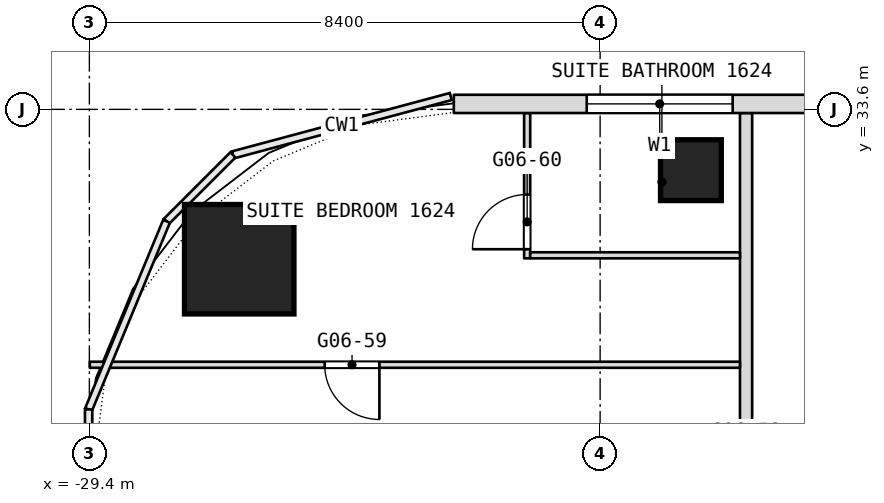
"""IFC4 building model, lengths in metres.
Left out: names, types, materials, properties, quantities, classifications, styles, units other than length and angle.
Written with IfcOpenShell. Run it as: python <this file> out.ifc"""

import sys

from ifc_helpers import new_model, si_unit, direction, frame, frame_2d, origin, origin_2d, place, context, subcontext, project, spatial, rectangle, extrude, element, fill, save


model = new_model("IFC4")
c1 = context("Model", 3, precision=1e-05, world=origin(), true_north=direction((0.0, 1.0)))
c2 = subcontext(c1, "Body", "Model", "MODEL_VIEW")
j1 = project(units=[si_unit("LENGTHUNIT", "METRE"), si_unit("PLANEANGLEUNIT", "RADIAN")], contexts=[c1])
p1 = place(None, origin())
s1 = spatial("IfcSite", under=j1, at=p1, CompositionType="ELEMENT")
p2 = place(p1, origin())
s2 = spatial("IfcBuilding", under=s1, at=p2, CompositionType="ELEMENT")
p3 = place(p2, frame((0.0, 0.0, 72.5)))
s3 = spatial("IfcBuildingStorey", under=s2, at=p3, CompositionType="ELEMENT", Elevation=72.5)
p4 = place(p3, frame((-26.936, 31.135, 0.0), z_axis=(0.0, 0.0, 1.0), x_axis=(1.0, 0.0, 0.0)))
e1 = element("IfcColumn", 1, at=p4, inside=s3, PredefinedType="COLUMN", context=c2, shape_type="SweptSolid", body=[
    extrude(rectangle(XDim=1.8, YDim=1.8, at=origin_2d()), origin(), (0.0, 0.0, 1.0), 3.6),
])
p5 = place(p3, frame((-19.507, 32.6, 0.0), z_axis=(0.0, 0.0, 1.0), x_axis=(1.0, 0.0, 0.0)))
e2 = element("IfcColumn", 2, at=p5, inside=s3, PredefinedType="COLUMN", context=c2, shape_type="SweptSolid", body=[
    extrude(rectangle(XDim=1.0, YDim=1.0, at=origin_2d()), origin(), (0.0, 0.0, 1.0), 3.6),
])
p6 = place(p3, frame((-18.6, 18.5, 0.0), z_axis=(0.0, 0.0, 1.0), x_axis=(0.0, 1.0, 0.0)))
e3 = element("IfcWall", 3, at=p6, inside=s3, PredefinedType="PARTITIONING", context=c2, shape_type="SweptSolid", body=[
    extrude(rectangle(XDim=15.04, YDim=0.2, at=frame_2d((7.52, 0.0))), origin(), (0.0, 0.0, 1.0), 3.34),
])
p7 = place(p6, frame((2.9, 0.0, 0.0)))
e4 = element("IfcOpeningElement", 4, at=p7, cuts=e3, PredefinedType="OPENING", context=c2, shape_type="SweptSolid", body=[
    extrude(rectangle(XDim=1.0, YDim=2.1, at=frame_2d((0.5, 1.05))), frame((0.0, 0.1, 0.0), z_axis=(0.0, -1.0, 0.0), x_axis=(1.0, 0.0, 0.0)), (0.0, 0.0, 1.0), 0.2),
])
p8 = place(p6, frame((8.25, 0.0, 0.0)))
e5 = element("IfcOpeningElement", 5, at=p8, cuts=e3, PredefinedType="OPENING", context=c2, shape_type="SweptSolid", body=[
    extrude(rectangle(XDim=1.1, YDim=2.1, at=frame_2d((0.55, 1.05))), frame((0.0, 0.1, 0.0), z_axis=(0.0, -1.0, 0.0), x_axis=(1.0, 0.0, 0.0)), (0.0, 0.0, 1.0), 0.2),
])
p9 = place(p3, frame((-22.2, 31.15, 0.0), z_axis=(0.0, 0.0, 1.0), x_axis=(0.0, 1.0, 0.0)))
e6 = element("IfcWall", 6, at=p9, inside=s3, PredefinedType="PARTITIONING", context=c2, shape_type="SweptSolid", body=[
    extrude(rectangle(XDim=2.39, YDim=0.1, at=frame_2d((1.195, 0.0))), origin(), (0.0, 0.0, 1.0), 3.34),
])
p10 = place(p9, frame((0.15, 0.0, 0.0)))
e7 = element("IfcOpeningElement", 7, at=p10, cuts=e6, PredefinedType="OPENING", context=c2, shape_type="SweptSolid", body=[
    extrude(rectangle(XDim=0.9, YDim=2.1, at=frame_2d((0.45, 1.05))), frame((0.0, 0.05, 0.0), z_axis=(0.0, -1.0, 0.0), x_axis=(1.0, 0.0, 0.0)), (0.0, 0.0, 1.0), 0.1),
])
p11 = place(p3, frame((-29.393, 29.4, 0.0), z_axis=(0.0, 0.0, 1.0), x_axis=(1.0, 0.0, 0.0)))
e8 = element("IfcWall", 8, at=p11, inside=s3, PredefinedType="PARTITIONING", context=c2, shape_type="SweptSolid", body=[
    extrude(rectangle(XDim=10.693, YDim=0.1, at=frame_2d((5.347, 0.0))), origin(), (0.0, 0.0, 1.0), 3.34),
])
p12 = place(p11, frame((3.863, 0.0, 0.0)))
e9 = element("IfcOpeningElement", 9, at=p12, cuts=e8, PredefinedType="OPENING", context=c2, shape_type="SweptSolid", body=[
    extrude(rectangle(XDim=0.9, YDim=2.1, at=frame_2d((0.45, 1.05))), frame((0.0, 0.05, 0.0), z_axis=(0.0, -1.0, 0.0), x_axis=(1.0, 0.0, 0.0)), (0.0, 0.0, 1.0), 0.1),
])
p13 = place(p3, frame((-22.15, 31.2, 0.0), z_axis=(0.0, 0.0, 1.0), x_axis=(1.0, 0.0, 0.0)))
e10 = element("IfcWall", 10, at=p13, inside=s3, PredefinedType="PARTITIONING", context=c2, shape_type="SweptSolid", body=[
    extrude(rectangle(XDim=3.45, YDim=0.1, at=frame_2d((1.725, 0.0))), origin(), (0.0, 0.0, 1.0), 3.34),
])
p14 = place(p3, frame((23.406, 33.69, 0.0), z_axis=(0.0, 0.0, 1.0), x_axis=(-1.0, 0.0, 0.0)))
e11 = element("IfcWall", 11, at=p14, inside=s3, PredefinedType="NOTDEFINED", context=c2, shape_type="SweptSolid", body=[
    extrude(rectangle(XDim=46.812, YDim=0.3, at=frame_2d((23.406, 0.0))), origin(), (0.0, 0.0, 1.0), 3.6),
])
p15 = place(p14, frame((2.186, 0.0, 0.9)))
e12 = element("IfcOpeningElement", 12, at=p15, cuts=e11, PredefinedType="OPENING", context=c2, shape_type="SweptSolid", body=[
    extrude(rectangle(XDim=2.4, YDim=2.1, at=frame_2d((1.2, 1.05))), frame((0.0, 0.15, 0.0), z_axis=(0.0, -1.0, 0.0), x_axis=(1.0, 0.0, 0.0)), (0.0, 0.0, 1.0), 0.3),
])
p16 = place(p14, frame((7.506, 0.0, 0.9)))
e13 = element("IfcOpeningElement", 13, at=p16, cuts=e11, PredefinedType="OPENING", context=c2, shape_type="SweptSolid", body=[
    extrude(rectangle(XDim=2.4, YDim=2.1, at=frame_2d((1.2, 1.05))), frame((0.0, 0.15, 0.0), z_axis=(0.0, -1.0, 0.0), x_axis=(1.0, 0.0, 0.0)), (0.0, 0.0, 1.0), 0.3),
])
p17 = place(p14, frame((11.706, 0.0, 0.9)))
e14 = element("IfcOpeningElement", 14, at=p17, cuts=e11, PredefinedType="OPENING", context=c2, shape_type="SweptSolid", body=[
    extrude(rectangle(XDim=2.4, YDim=2.1, at=frame_2d((1.2, 1.05))), frame((0.0, 0.15, 0.0), z_axis=(0.0, -1.0, 0.0), x_axis=(1.0, 0.0, 0.0)), (0.0, 0.0, 1.0), 0.3),
])
p18 = place(p14, frame((15.906, 0.0, 0.9)))
e15 = element("IfcOpeningElement", 15, at=p18, cuts=e11, PredefinedType="OPENING", context=c2, shape_type="SweptSolid", body=[
    extrude(rectangle(XDim=2.4, YDim=2.1, at=frame_2d((1.2, 1.05))), frame((0.0, 0.15, 0.0), z_axis=(0.0, -1.0, 0.0), x_axis=(1.0, 0.0, 0.0)), (0.0, 0.0, 1.0), 0.3),
])
p19 = place(p14, frame((20.106, 0.0, 0.9)))
e16 = element("IfcOpeningElement", 16, at=p19, cuts=e11, PredefinedType="OPENING", context=c2, shape_type="SweptSolid", body=[
    extrude(rectangle(XDim=2.4, YDim=2.1, at=frame_2d((1.2, 1.05))), frame((0.0, 0.15, 0.0), z_axis=(0.0, -1.0, 0.0), x_axis=(1.0, 0.0, 0.0)), (0.0, 0.0, 1.0), 0.3),
])
p20 = place(p14, frame((24.306, 0.0, 0.9)))
e17 = element("IfcOpeningElement", 17, at=p20, cuts=e11, PredefinedType="OPENING", context=c2, shape_type="SweptSolid", body=[
    extrude(rectangle(XDim=2.4, YDim=2.1, at=frame_2d((1.2, 1.05))), frame((0.0, 0.15, 0.0), z_axis=(0.0, -1.0, 0.0), x_axis=(1.0, 0.0, 0.0)), (0.0, 0.0, 1.0), 0.3),
])
p21 = place(p14, frame((28.506, 0.0, 0.9)))
e18 = element("IfcOpeningElement", 18, at=p21, cuts=e11, PredefinedType="OPENING", context=c2, shape_type="SweptSolid", body=[
    extrude(rectangle(XDim=2.4, YDim=2.1, at=frame_2d((1.2, 1.05))), frame((0.0, 0.15, 0.0), z_axis=(0.0, -1.0, 0.0), x_axis=(1.0, 0.0, 0.0)), (0.0, 0.0, 1.0), 0.3),
])
p22 = place(p14, frame((32.706, 0.0, 0.9)))
e19 = element("IfcOpeningElement", 19, at=p22, cuts=e11, PredefinedType="OPENING", context=c2, shape_type="SweptSolid", body=[
    extrude(rectangle(XDim=2.4, YDim=2.1, at=frame_2d((1.2, 1.05))), frame((0.0, 0.15, 0.0), z_axis=(0.0, -1.0, 0.0), x_axis=(1.0, 0.0, 0.0)), (0.0, 0.0, 1.0), 0.3),
])
p23 = place(p14, frame((36.906, 0.0, 0.9)))
e20 = element("IfcOpeningElement", 20, at=p23, cuts=e11, PredefinedType="OPENING", context=c2, shape_type="SweptSolid", body=[
    extrude(rectangle(XDim=2.4, YDim=2.1, at=frame_2d((1.2, 1.05))), frame((0.0, 0.15, 0.0), z_axis=(0.0, -1.0, 0.0), x_axis=(1.0, 0.0, 0.0)), (0.0, 0.0, 1.0), 0.3),
])
p24 = place(p14, frame((42.226, 0.0, 0.9)))
e21 = element("IfcOpeningElement", 21, at=p24, cuts=e11, PredefinedType="OPENING", context=c2, shape_type="SweptSolid", body=[
    extrude(rectangle(XDim=2.4, YDim=2.1, at=frame_2d((1.2, 1.05))), frame((0.0, 0.15, 0.0), z_axis=(0.0, -1.0, 0.0), x_axis=(1.0, 0.0, 0.0)), (0.0, 0.0, 1.0), 0.3),
])
p25 = place(p10, origin())
e22 = element("IfcDoor", 22, at=p25, inside=s3, OperationType="SINGLE_SWING_RIGHT", PredefinedType="DOOR", context=c2, shape_type="SweptSolid", body=[
    extrude(rectangle(XDim=0.9, YDim=2.1, at=frame_2d((0.45, 1.05))), frame((0.0, 0.025, 0.0), z_axis=(0.0, -1.0, 0.0), x_axis=(1.0, 0.0, 0.0)), (0.0, 0.0, 1.0), 0.05),
])
fill(e7, e22)
p26 = place(p12, origin())
e23 = element("IfcDoor", 23, at=p26, inside=s3, OperationType="SINGLE_SWING_LEFT", PredefinedType="DOOR", context=c2, shape_type="SweptSolid", body=[
    extrude(rectangle(XDim=0.9, YDim=2.1, at=frame_2d((0.45, 1.05))), frame((0.0, 0.025, 0.0), z_axis=(0.0, -1.0, 0.0), x_axis=(1.0, 0.0, 0.0)), (0.0, 0.0, 1.0), 0.05),
])
fill(e9, e23)
p27 = place(p24, origin())
e24 = element("IfcWindow", 24, at=p27, inside=s3, PartitioningType="SINGLE_PANEL", PredefinedType="WINDOW", context=c2, shape_type="SweptSolid", body=[
    extrude(rectangle(XDim=2.4, YDim=2.1, at=frame_2d((1.2, 1.05))), frame((0.0, 0.03, 0.0), z_axis=(0.0, -1.0, 0.0), x_axis=(1.0, 0.0, 0.0)), (0.0, 0.0, 1.0), 0.06),
])
fill(e21, e24)
save(model, sys.argv[1])
